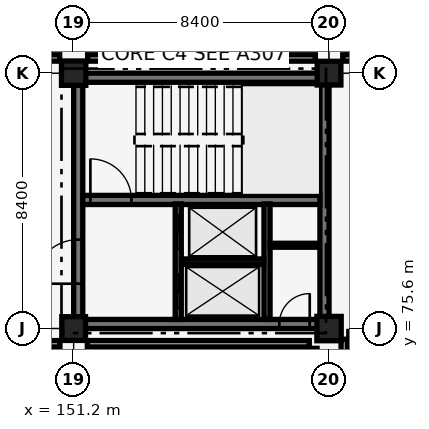
"""IFC4 building model, lengths in metres.
Left out: names, types, materials, properties, quantities, classifications, styles, units other than length and angle.
Written with IfcOpenShell. Run it as: python <this file> out.ifc"""

import sys

from ifc_helpers import new_model, si_unit, direction, frame, frame_2d, origin, origin_2d, place, context, subcontext, project, spatial, rectangle, extrude, element, fill, save


model = new_model("IFC4")
c1 = context("Model", 3, precision=1e-05, world=origin(), true_north=direction((0.0, 1.0)))
c2 = subcontext(c1, "Body", "Model", "MODEL_VIEW")
j1 = project(units=[si_unit("LENGTHUNIT", "METRE"), si_unit("PLANEANGLEUNIT", "RADIAN")], contexts=[c1])
p1 = place(None, origin())
s1 = spatial("IfcSite", under=j1, at=p1, CompositionType="ELEMENT")
p2 = place(p1, origin())
s2 = spatial("IfcBuilding", under=s1, at=p2, CompositionType="ELEMENT")
p3 = place(p2, frame((0.0, 0.0, -4.42)))
s3 = spatial("IfcBuildingStorey", under=s2, at=p3, CompositionType="ELEMENT", Elevation=-4.42)
p4 = place(p3, frame((151.35, 75.75, 0.0), z_axis=(0.0, 0.0, 1.0), x_axis=(1.0, 0.0, 0.0)))
e1 = element("IfcWall", 1, at=p4, inside=s3, PredefinedType="SHEAR", context=c2, shape_type="SweptSolid", body=[
    extrude(rectangle(XDim=8.1, YDim=0.3, at=frame_2d((4.05, 0.0))), origin(), (0.0, 0.0, 1.0), 4.12),
])
p5 = place(p4, frame((6.615, 0.0, 0.0)))
e2 = element("IfcOpeningElement", 2, at=p5, cuts=e1, PredefinedType="OPENING", context=c2, shape_type="SweptSolid", body=[
    extrude(rectangle(XDim=1.0, YDim=2.15, at=frame_2d((0.5, 1.075))), frame((0.0, 0.16, 0.0), z_axis=(0.0, -1.0, 0.0), x_axis=(1.0, 0.0, 0.0)), (0.0, 0.0, 1.0), 0.32),
])
p6 = place(p3, frame((151.35, 83.85, 0.0), z_axis=(0.0, 0.0, 1.0), x_axis=(1.0, 0.0, 0.0)))
e3 = element("IfcWall", 3, at=p6, inside=s3, PredefinedType="SHEAR", context=c2, shape_type="SweptSolid", body=[
    extrude(rectangle(XDim=8.1, YDim=0.3, at=frame_2d((4.05, 0.0))), origin(), (0.0, 0.0, 1.0), 4.12),
])
p7 = place(p3, frame((151.35, 75.75, 0.0), z_axis=(0.0, 0.0, 1.0), x_axis=(0.0, 1.0, 0.0)))
e4 = element("IfcWall", 4, at=p7, inside=s3, PredefinedType="SHEAR", context=c2, shape_type="SweptSolid", body=[
    extrude(rectangle(XDim=8.1, YDim=0.3, at=frame_2d((4.05, 0.0))), origin(), (0.0, 0.0, 1.0), 4.12),
])
p8 = place(p7, frame((1.325, 0.0, 0.0)))
e5 = element("IfcOpeningElement", 5, at=p8, cuts=e4, PredefinedType="OPENING", context=c2, shape_type="SweptSolid", body=[
    extrude(rectangle(XDim=1.45, YDim=2.15, at=frame_2d((0.725, 1.075))), frame((0.0, 0.16, 0.0), z_axis=(0.0, -1.0, 0.0), x_axis=(1.0, 0.0, 0.0)), (0.0, 0.0, 1.0), 0.32),
])
p9 = place(p3, frame((159.45, 75.75, 0.0), z_axis=(0.0, 0.0, 1.0), x_axis=(0.0, 1.0, 0.0)))
e6 = element("IfcWall", 6, at=p9, inside=s3, PredefinedType="SHEAR", context=c2, shape_type="SweptSolid", body=[
    extrude(rectangle(XDim=8.1, YDim=0.3, at=frame_2d((4.05, 0.0))), origin(), (0.0, 0.0, 1.0), 4.12),
])
p10 = place(p3, frame((151.5, 79.83, 0.0), z_axis=(0.0, 0.0, 1.0), x_axis=(1.0, 0.0, 0.0)))
e7 = element("IfcWall", 7, at=p10, inside=s3, PredefinedType="SHEAR", context=c2, shape_type="SweptSolid", body=[
    extrude(rectangle(XDim=7.8, YDim=0.3, at=frame_2d((3.9, 0.0))), origin(), (0.0, 0.0, 1.0), 4.12),
])
p11 = place(p10, frame((0.25, 0.0, 0.0)))
e8 = element("IfcOpeningElement", 8, at=p11, cuts=e7, PredefinedType="OPENING", context=c2, shape_type="SweptSolid", body=[
    extrude(rectangle(XDim=1.35, YDim=2.15, at=frame_2d((0.675, 1.075))), frame((0.0, 0.16, 0.0), z_axis=(0.0, -1.0, 0.0), x_axis=(1.0, 0.0, 0.0)), (0.0, 0.0, 1.0), 0.32),
])
p12 = place(p3, frame((151.2, 75.6, -0.4), z_axis=(0.0, 0.0, 1.0), x_axis=(1.0, 0.0, 0.0)))
e9 = element("IfcColumn", 9, at=p12, inside=s3, PredefinedType="COLUMN", context=c2, shape_type="SweptSolid", body=[
    extrude(rectangle(XDim=0.78, YDim=0.78, at=origin_2d()), origin(), (0.0, 0.0, 1.0), 4.52),
])
for number, where, z_axis, x_axis in (
    (10, (151.2, 84.0, -0.4), (0.0, 0.0, 1.0), (1.0, 0.0, 0.0)),
    (11, (159.6, 75.6, -0.4), (0.0, 0.0, 1.0), (1.0, 0.0, 0.0)),
):
    element("IfcColumn", number, at=place(p3, frame(where, z_axis=z_axis, x_axis=x_axis)), inside=s3, PredefinedType="COLUMN", context=c2, shape_type="SweptSolid", body=[
        extrude(rectangle(XDim=0.8, YDim=0.8, at=origin_2d()), origin(), (0.0, 0.0, 1.0), 4.52),
    ])
p13 = place(p3, frame((159.6, 84.0, -0.4), z_axis=(0.0, 0.0, 1.0), x_axis=(1.0, 0.0, 0.0)))
e12 = element("IfcColumn", 12, at=p13, inside=s3, PredefinedType="COLUMN", context=c2, shape_type="SweptSolid", body=[
    extrude(rectangle(XDim=0.78, YDim=0.78, at=origin_2d()), origin(), (0.0, 0.0, 1.0), 4.52),
])
p14 = place(p3, frame((154.64, 75.9, 0.0), z_axis=(0.0, 0.0, 1.0), x_axis=(0.0, 1.0, 0.0)))
e13 = element("IfcWall", 13, at=p14, inside=s3, PredefinedType="SHEAR", context=c2, shape_type="SweptSolid", body=[
    extrude(rectangle(XDim=3.8, YDim=0.2, at=frame_2d((1.9, 0.0))), origin(), (0.0, 0.0, 1.0), 3.17),
])
p15 = place(p14, frame((0.375, 0.0, 0.0)))
e14 = element("IfcOpeningElement", 14, at=p15, cuts=e13, PredefinedType="OPENING", context=c2, shape_type="SweptSolid", body=[
    extrude(rectangle(XDim=1.1, YDim=2.15, at=frame_2d((0.55, 1.075))), frame((0.0, 0.11, 0.0), z_axis=(0.0, -1.0, 0.0), x_axis=(1.0, 0.0, 0.0)), (0.0, 0.0, 1.0), 0.22),
])
p16 = place(p14, frame((2.325, 0.0, 0.0)))
e15 = element("IfcOpeningElement", 15, at=p16, cuts=e13, PredefinedType="OPENING", context=c2, shape_type="SweptSolid", body=[
    extrude(rectangle(XDim=1.1, YDim=2.15, at=frame_2d((0.55, 1.075))), frame((0.0, 0.11, 0.0), z_axis=(0.0, -1.0, 0.0), x_axis=(1.0, 0.0, 0.0)), (0.0, 0.0, 1.0), 0.22),
])
p17 = place(p3, frame((157.56, 75.9, 0.0), z_axis=(0.0, 0.0, 1.0), x_axis=(0.0, 1.0, 0.0)))
e16 = element("IfcWall", 16, at=p17, inside=s3, PredefinedType="SHEAR", context=c2, shape_type="SweptSolid", body=[
    extrude(rectangle(XDim=3.8, YDim=0.2, at=frame_2d((1.9, 0.0))), origin(), (0.0, 0.0, 1.0), 3.17),
])
p18 = place(p3, frame((154.75, 77.8, 0.0), z_axis=(0.0, 0.0, 1.0), x_axis=(1.0, 0.0, 0.0)))
e17 = element("IfcWall", 17, at=p18, inside=s3, PredefinedType="SHEAR", context=c2, shape_type="SweptSolid", body=[
    extrude(rectangle(XDim=2.7, YDim=0.18, at=frame_2d((1.35, 0.0))), origin(), (0.0, 0.0, 1.0), 4.12),
])
p19 = place(p3, frame((157.66, 78.34, 0.0), z_axis=(0.0, 0.0, 1.0), x_axis=(1.0, 0.0, 0.0)))
e18 = element("IfcWall", 18, at=p19, inside=s3, PredefinedType="PARTITIONING", context=c2, shape_type="SweptSolid", body=[
    extrude(rectangle(XDim=1.62, YDim=0.13, at=frame_2d((0.81, 0.0))), origin(), (0.0, 0.0, 1.0), 4.12),
])
p20 = place(p3, frame((160.25, 75.4, 0.0), z_axis=(0.0, 0.0, 1.0), x_axis=(1.0, 0.0, 0.0)))
e19 = element("IfcWall", 19, at=p20, inside=s3, PredefinedType="PARTITIONING", context=c2, shape_type="SweptSolid", body=[
    extrude(rectangle(XDim=7.2, YDim=0.21, at=frame_2d((3.6, 0.0))), origin(), (0.0, 0.0, 1.0), 3.17),
])
p21 = place(p3, frame((160.1, 67.65, 0.0), z_axis=(0.0, 0.0, 1.0), x_axis=(0.0, 1.0, 0.0)))
e20 = element("IfcWall", 20, at=p21, inside=s3, PredefinedType="PARTITIONING", context=c2, shape_type="SweptSolid", body=[
    extrude(rectangle(XDim=7.6, YDim=0.21, at=frame_2d((3.8, 0.0))), origin(), (0.0, 0.0, 1.0), 3.17),
])
p22 = place(p3, frame((143.26, 75.1, 0.0), z_axis=(0.0, 0.0, 1.0), x_axis=(1.0, 0.0, 0.0)))
e21 = element("IfcWall", 21, at=p22, inside=s3, PredefinedType="PARTITIONING", context=c2, shape_type="SweptSolid", body=[
    extrude(rectangle(XDim=7.49, YDim=0.21, at=frame_2d((3.745, 0.0))), origin(), (0.0, 0.0, 1.0), 4.12),
])
p23 = place(p3, frame((151.65, 75.1, 0.0), z_axis=(0.0, 0.0, 1.0), x_axis=(1.0, 0.0, 0.0)))
e22 = element("IfcWall", 22, at=p23, inside=s3, PredefinedType="PARTITIONING", context=c2, shape_type="SweptSolid", body=[
    extrude(rectangle(XDim=7.3, YDim=0.21, at=frame_2d((3.65, 0.0))), origin(), (0.0, 0.0, 1.0), 4.12),
])
p24 = place(p3, frame((159.1, 67.65, 0.0), z_axis=(0.0, 0.0, 1.0), x_axis=(0.0, 1.0, 0.0)))
e23 = element("IfcWall", 23, at=p24, inside=s3, PredefinedType="PARTITIONING", context=c2, shape_type="SweptSolid", body=[
    extrude(rectangle(XDim=7.3, YDim=0.21, at=frame_2d((3.65, 0.0))), origin(), (0.0, 0.0, 1.0), 3.57),
])
p25 = place(p3, frame((143.45, 84.5, 0.0), z_axis=(0.0, 0.0, 1.0), x_axis=(1.0, 0.0, 0.0)))
e24 = element("IfcWall", 24, at=p25, inside=s3, PredefinedType="PARTITIONING", context=c2, shape_type="SweptSolid", body=[
    extrude(rectangle(XDim=7.29, YDim=0.21, at=frame_2d((3.645, 0.0))), origin(), (0.0, 0.0, 1.0), 4.12),
])
p26 = place(p25, frame((2.945, 0.0, 0.0)))
e25 = element("IfcOpeningElement", 25, at=p26, cuts=e24, PredefinedType="OPENING", context=c2, shape_type="SweptSolid", body=[
    extrude(rectangle(XDim=1.4, YDim=2.2, at=frame_2d((0.7, 1.1))), frame((0.0, 0.115, 0.0), z_axis=(0.0, -1.0, 0.0), x_axis=(1.0, 0.0, 0.0)), (0.0, 0.0, 1.0), 0.23),
])
p27 = place(p3, frame((151.66, 84.5, 0.0), z_axis=(0.0, 0.0, 1.0), x_axis=(1.0, 0.0, 0.0)))
e26 = element("IfcWall", 26, at=p27, inside=s3, PredefinedType="PARTITIONING", context=c2, shape_type="SweptSolid", body=[
    extrude(rectangle(XDim=7.49, YDim=0.21, at=frame_2d((3.745, 0.0))), origin(), (0.0, 0.0, 1.0), 4.12),
])
p28 = place(p3, frame((160.05, 84.5, 0.0), z_axis=(0.0, 0.0, 1.0), x_axis=(1.0, 0.0, 0.0)))
e27 = element("IfcWall", 27, at=p28, inside=s3, PredefinedType="PARTITIONING", context=c2, shape_type="SweptSolid", body=[
    extrude(rectangle(XDim=7.77, YDim=0.21, at=frame_2d((3.885, 0.0))), origin(), (0.0, 0.0, 1.0), 3.37),
])
p29 = place(p11, origin())
e28 = element("IfcDoor", 28, at=p29, inside=s3, OperationType="SINGLE_SWING_LEFT", PredefinedType="DOOR", context=c2, shape_type="SweptSolid", body=[
    extrude(rectangle(XDim=1.35, YDim=2.15, at=frame_2d((0.675, 1.075))), frame((0.0, 0.025, 0.0), z_axis=(0.0, -1.0, 0.0), x_axis=(1.0, 0.0, 0.0)), (0.0, 0.0, 1.0), 0.05),
])
fill(e8, e28)
p30 = place(p15, origin())
e29 = element("IfcDoor", 29, at=p30, inside=s3, OperationType="SLIDING_TO_LEFT", PredefinedType="DOOR", context=c2, shape_type="SweptSolid", body=[
    extrude(rectangle(XDim=1.1, YDim=2.15, at=frame_2d((0.55, 1.075))), frame((0.0, 0.025, 0.0), z_axis=(0.0, -1.0, 0.0), x_axis=(1.0, 0.0, 0.0)), (0.0, 0.0, 1.0), 0.05),
])
fill(e14, e29)
p31 = place(p16, origin())
e30 = element("IfcDoor", 30, at=p31, inside=s3, OperationType="SLIDING_TO_LEFT", PredefinedType="DOOR", context=c2, shape_type="SweptSolid", body=[
    extrude(rectangle(XDim=1.1, YDim=2.15, at=frame_2d((0.55, 1.075))), frame((0.0, 0.025, 0.0), z_axis=(0.0, -1.0, 0.0), x_axis=(1.0, 0.0, 0.0)), (0.0, 0.0, 1.0), 0.05),
])
fill(e15, e30)
p32 = place(p8, origin())
e31 = element("IfcDoor", 31, at=p32, inside=s3, OperationType="DOUBLE_DOOR_SINGLE_SWING", PredefinedType="DOOR", context=c2, shape_type="SweptSolid", body=[
    extrude(rectangle(XDim=1.45, YDim=2.15, at=frame_2d((0.725, 1.075))), frame((0.0, 0.025, 0.0), z_axis=(0.0, -1.0, 0.0), x_axis=(1.0, 0.0, 0.0)), (0.0, 0.0, 1.0), 0.05),
])
fill(e5, e31)
p33 = place(p5, origin())
e32 = element("IfcDoor", 32, at=p33, inside=s3, OperationType="SINGLE_SWING_RIGHT", PredefinedType="DOOR", context=c2, shape_type="SweptSolid", body=[
    extrude(rectangle(XDim=1.0, YDim=2.15, at=frame_2d((0.5, 1.075))), frame((0.0, 0.025, 0.0), z_axis=(0.0, -1.0, 0.0), x_axis=(1.0, 0.0, 0.0)), (0.0, 0.0, 1.0), 0.05),
])
fill(e2, e32)
save(model, sys.argv[1])
